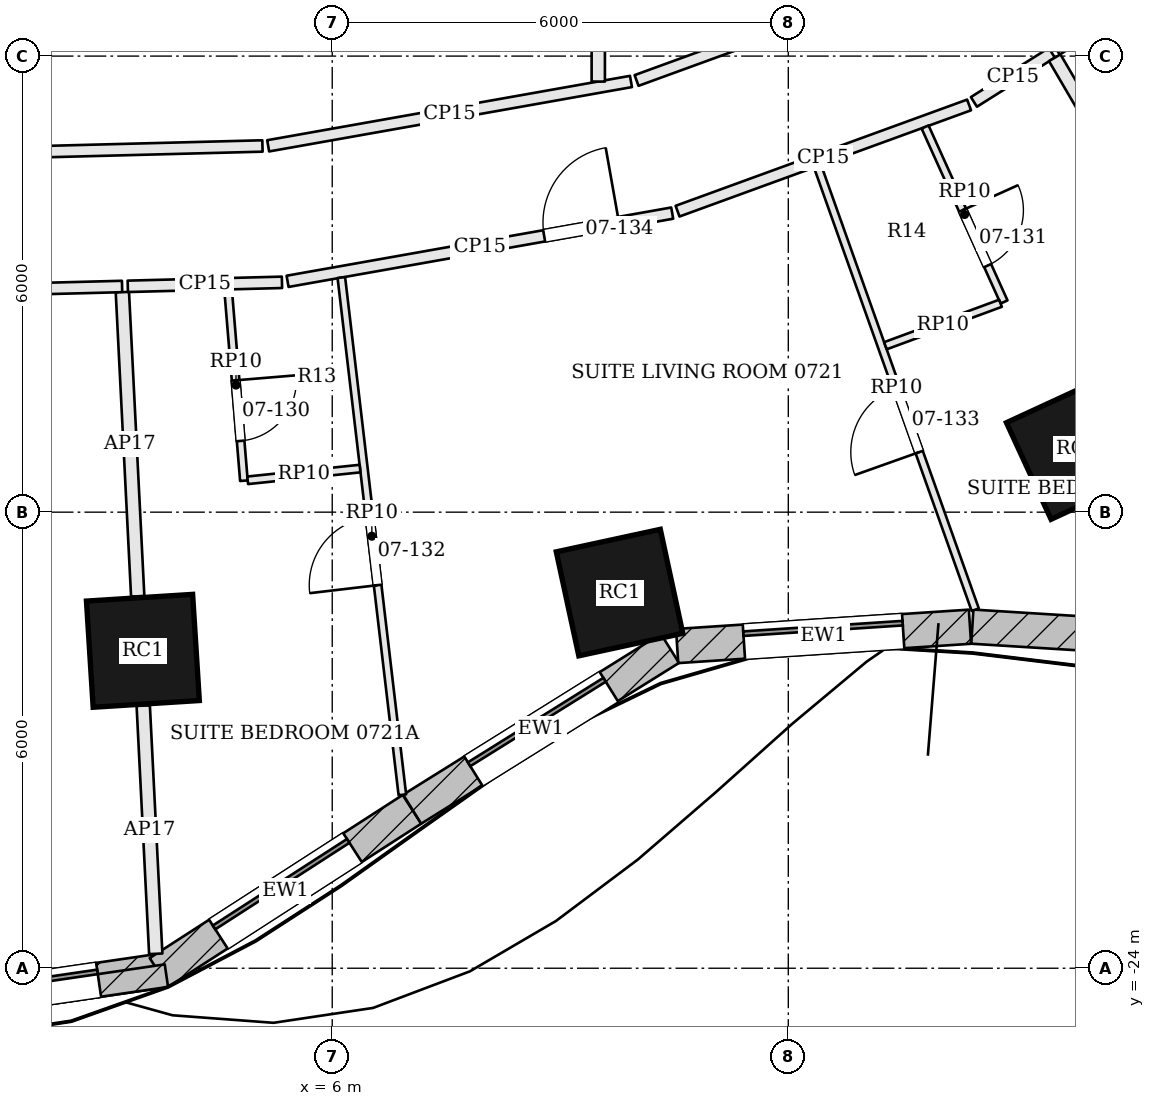
"""IFC4 building model, lengths in metres.
Left out: names, types, materials, properties, quantities, classifications, styles, units other than length and angle.
Written with IfcOpenShell. Run it as: python <this file> out.ifc"""

import sys

from ifc_helpers import new_model, si_unit, direction, frame, frame_2d, origin, origin_2d, place, context, subcontext, project, spatial, rectangle, extrude, element, fill, save


model = new_model("IFC4")
c1 = context("Model", 3, precision=1e-05, world=origin(), true_north=direction((0.0, 1.0)))
c2 = subcontext(c1, "Body", "Model", "MODEL_VIEW")
j1 = project(units=[si_unit("LENGTHUNIT", "METRE"), si_unit("PLANEANGLEUNIT", "RADIAN")], contexts=[c1])
p1 = place(None, origin())
s1 = spatial("IfcSite", under=j1, at=p1, CompositionType="ELEMENT")
p2 = place(p1, origin())
s2 = spatial("IfcBuilding", under=s1, at=p2, CompositionType="ELEMENT")
p3 = place(p2, frame((0.0, 0.0, 41.1)))
s3 = spatial("IfcBuildingStorey", under=s2, at=p3, CompositionType="ELEMENT", Elevation=41.1)
for number, where, z_axis, x_axis in (
    (1, (3.509, -19.824, 0.0), (0.0, 0.0, 1.0), (0.998, 0.063, 0.0)),
    (2, (9.78, -19.058, 0.0), (0.0, 0.0, 1.0), (0.977, 0.211, 0.0)),
    (3, (15.799, -17.165, 0.0), (0.0, 0.0, 1.0), (0.908, 0.419, 0.0)),
):
    element("IfcColumn", number, at=place(p3, frame(where, z_axis=z_axis, x_axis=x_axis)), inside=s3, PredefinedType="COLUMN", context=c2, shape_type="SweptSolid", body=[
        extrude(rectangle(XDim=1.4, YDim=1.4, at=origin_2d()), origin(), (0.0, 0.0, 1.0), 3.6),
    ])
p4 = place(p3, frame((-0.032, -24.584, 0.0), z_axis=(0.0, 0.0, 1.0), x_axis=(0.989495330387, 0.144564833698, 0.0)))
e4 = element("IfcWall", 4, at=p4, inside=s3, PredefinedType="SOLIDWALL", context=c2, shape_type="SweptSolid", body=[
    extrude(rectangle(XDim=3.881, YDim=0.45, at=frame_2d((1.94, 0.0))), origin(), (0.0, 0.0, 1.0), 3.4),
])
p5 = place(p4, frame((0.89, 0.0, 0.9)))
e5 = element("IfcOpeningElement", 5, at=p5, cuts=e4, PredefinedType="OPENING", context=c2, shape_type="SweptSolid", body=[
    extrude(rectangle(XDim=2.1, YDim=2.0, at=frame_2d((1.05, 1.0))), frame((0.0, 0.235, 0.0), z_axis=(0.0, -1.0, 0.0), x_axis=(1.0, 0.0, 0.0)), (0.0, 0.0, 1.0), 0.47),
])
p6 = place(p3, frame((3.721, -24.055, 0.0), z_axis=(0.0, 0.0, 1.0), x_axis=(0.840404438766, 0.54195975801, 0.0)))
e6 = element("IfcWall", 6, at=p6, inside=s3, PredefinedType="SOLIDWALL", context=c2, shape_type="SweptSolid", body=[
    extrude(rectangle(XDim=3.96, YDim=0.45, at=frame_2d((1.98, 0.0))), origin(), (0.0, 0.0, 1.0), 3.4),
])
p7 = place(p6, frame((0.93, 0.0, 0.9)))
e7 = element("IfcOpeningElement", 7, at=p7, cuts=e6, PredefinedType="OPENING", context=c2, shape_type="SweptSolid", body=[
    extrude(rectangle(XDim=2.1, YDim=2.0, at=frame_2d((1.05, 1.0))), frame((0.0, 0.235, 0.0), z_axis=(0.0, -1.0, 0.0), x_axis=(1.0, 0.0, 0.0)), (0.0, 0.0, 1.0), 0.47),
])
p8 = place(p3, frame((7.052, -21.907, 0.0), z_axis=(0.0, 0.0, 1.0), x_axis=(0.848498976054, 0.529197021566, 0.0)))
e8 = element("IfcWall", 8, at=p8, inside=s3, PredefinedType="SOLIDWALL", context=c2, shape_type="SweptSolid", body=[
    extrude(rectangle(XDim=3.997, YDim=0.45, at=frame_2d((1.998, 0.0))), origin(), (0.0, 0.0, 1.0), 3.4),
])
p9 = place(p8, frame((0.948, 0.0, 0.9)))
e9 = element("IfcOpeningElement", 9, at=p9, cuts=e8, PredefinedType="OPENING", context=c2, shape_type="SweptSolid", body=[
    extrude(rectangle(XDim=2.1, YDim=2.0, at=frame_2d((1.05, 1.0))), frame((0.0, 0.235, 0.0), z_axis=(0.0, -1.0, 0.0), x_axis=(1.0, 0.0, 0.0)), (0.0, 0.0, 1.0), 0.47),
])
p10 = place(p3, frame((10.537, -19.761, 0.0), z_axis=(0.0, 0.0, 1.0), x_axis=(0.997831357874, 0.065822346084, 0.0)))
e10 = element("IfcWall", 10, at=p10, inside=s3, PredefinedType="SOLIDWALL", context=c2, shape_type="SweptSolid", body=[
    extrude(rectangle(XDim=3.861, YDim=0.45, at=frame_2d((1.931, 0.0))), origin(), (0.0, 0.0, 1.0), 3.4),
])
p11 = place(p10, frame((0.881, 0.0, 0.9)))
e11 = element("IfcOpeningElement", 11, at=p11, cuts=e10, PredefinedType="OPENING", context=c2, shape_type="SweptSolid", body=[
    extrude(rectangle(XDim=2.1, YDim=2.0, at=frame_2d((1.05, 1.0))), frame((0.0, 0.235, 0.0), z_axis=(0.0, -1.0, 0.0), x_axis=(1.0, 0.0, 0.0)), (0.0, 0.0, 1.0), 0.47),
])
p12 = place(p3, frame((14.421, -19.506, 0.0), z_axis=(0.0, 0.0, 1.0), x_axis=(0.998078573447, -0.06196096534, 0.0)))
e12 = element("IfcWall", 12, at=p12, inside=s3, PredefinedType="SOLIDWALL", context=c2, shape_type="SweptSolid", body=[
    extrude(rectangle(XDim=5.682, YDim=0.45, at=frame_2d((2.841, 0.0))), origin(), (0.0, 0.0, 1.0), 3.4),
])
p13 = place(p12, frame((1.791, 0.0, 0.9)))
e13 = element("IfcOpeningElement", 13, at=p13, cuts=e12, PredefinedType="OPENING", context=c2, shape_type="SweptSolid", body=[
    extrude(rectangle(XDim=2.1, YDim=2.0, at=frame_2d((1.05, 1.0))), frame((0.0, 0.235, 0.0), z_axis=(0.0, -1.0, 0.0), x_axis=(1.0, 0.0, 0.0)), (0.0, 0.0, 1.0), 0.47),
])
p14 = place(p3, frame((0.091, -24.642, 3.6), z_axis=(0.0, 0.0, 1.0), x_axis=(0.989502691406, 0.144514441145, 0.0)))
e14 = element("IfcWall", 14, at=p14, inside=s3, PredefinedType="PARAPET", context=c2, shape_type="SweptSolid", body=[
    extrude(rectangle(XDim=3.767, YDim=0.3, at=frame_2d((1.884, 0.0))), origin(), (0.0, 0.0, 1.0), 1.1),
])
p15 = place(p3, frame((-2.114, -15.17, 0.0), z_axis=(0.0, 0.0, 1.0), x_axis=(0.99966176809, 0.02600671875, 0.0)))
e15 = element("IfcWall", 15, at=p15, inside=s3, PredefinedType="PARTITIONING", context=c2, shape_type="SweptSolid", body=[
    extrude(rectangle(XDim=5.351, YDim=0.15, at=frame_2d((2.675, 0.0))), origin(), (0.0, 0.0, 1.0), 2.68),
])
p16 = place(p15, frame((0.45, 0.0, 0.0)))
e16 = element("IfcOpeningElement", 16, at=p16, cuts=e15, PredefinedType="OPENING", context=c2, shape_type="SweptSolid", body=[
    extrude(rectangle(XDim=1.0, YDim=2.1, at=frame_2d((0.5, 1.05))), frame((0.0, 0.085, 0.0), z_axis=(0.0, -1.0, 0.0), x_axis=(1.0, 0.0, 0.0)), (0.0, 0.0, 1.0), 0.17),
])
p17 = place(p3, frame((3.678, -23.81, 0.0), z_axis=(0.0, 0.0, 1.0), x_axis=(-0.050406902628, 0.998728764063, 0.0)))
e17 = element("IfcWall", 17, at=p17, inside=s3, PredefinedType="PARTITIONING", context=c2, shape_type="SweptSolid", body=[
    extrude(rectangle(XDim=3.269, YDim=0.175, at=frame_2d((1.635, 0.0))), origin(), (0.0, 0.0, 1.0), 2.68),
])
p18 = place(p3, frame((3.441, -19.107, 0.0), z_axis=(0.0, 0.0, 1.0), x_axis=(-0.050399621173, 0.998729131539, 0.0)))
e18 = element("IfcWall", 18, at=p18, inside=s3, PredefinedType="PARTITIONING", context=c2, shape_type="SweptSolid", body=[
    extrude(rectangle(XDim=4.006, YDim=0.175, at=frame_2d((2.003, 0.0))), origin(), (0.0, 0.0, 1.0), 2.68),
])
p19 = place(p3, frame((3.31, -15.029, 0.0), z_axis=(0.0, 0.0, 1.0), x_axis=(0.99966219628, 0.025990254501, 0.0)))
e19 = element("IfcWall", 19, at=p19, inside=s3, PredefinedType="PARTITIONING", context=c2, shape_type="SweptSolid", body=[
    extrude(rectangle(XDim=2.029, YDim=0.15, at=frame_2d((1.015, 0.0))), origin(), (0.0, 0.0, 1.0), 2.68),
])
p20 = place(p3, frame((5.413, -14.963, 0.0), z_axis=(0.0, 0.0, 1.0), x_axis=(0.984633017555, 0.174636252655, 0.0)))
e20 = element("IfcWall", 20, at=p20, inside=s3, PredefinedType="PARTITIONING", context=c2, shape_type="SweptSolid", body=[
    extrude(rectangle(XDim=5.139, YDim=0.15, at=frame_2d((2.569, 0.0))), origin(), (0.0, 0.0, 1.0), 2.68),
])
p21 = place(p20, frame((3.428, 0.0, 0.0)))
e21 = element("IfcOpeningElement", 21, at=p21, cuts=e20, PredefinedType="OPENING", context=c2, shape_type="SweptSolid", body=[
    extrude(rectangle(XDim=1.0, YDim=2.1, at=frame_2d((0.5, 1.05))), frame((0.0, 0.085, 0.0), z_axis=(0.0, -1.0, 0.0), x_axis=(1.0, 0.0, 0.0)), (0.0, 0.0, 1.0), 0.17),
])
p22 = place(p3, frame((10.543, -14.04, 0.0), z_axis=(0.0, 0.0, 1.0), x_axis=(0.939576705301, 0.342338450741, 0.0)))
e22 = element("IfcWall", 22, at=p22, inside=s3, PredefinedType="PARTITIONING", context=c2, shape_type="SweptSolid", body=[
    extrude(rectangle(XDim=4.082, YDim=0.15, at=frame_2d((2.041, 0.0))), origin(), (0.0, 0.0, 1.0), 2.68),
])
p23 = place(p3, frame((14.442, -12.603, 0.0), z_axis=(0.0, 0.0, 1.0), x_axis=(0.845976983642, 0.533219413701, 0.0)))
e23 = element("IfcWall", 23, at=p23, inside=s3, PredefinedType="PARTITIONING", context=c2, shape_type="SweptSolid", body=[
    extrude(rectangle(XDim=1.211, YDim=0.15, at=frame_2d((0.606, 0.0))), origin(), (0.0, 0.0, 1.0), 2.68),
])
p24 = place(p3, frame((19.958, -19.62, 0.0), z_axis=(0.0, 0.0, 1.0), x_axis=(-0.505643381875, 0.862742586387, 0.0)))
e24 = element("IfcWall", 24, at=p24, inside=s3, PredefinedType="PARTITIONING", context=c2, shape_type="SweptSolid", body=[
    extrude(rectangle(XDim=8.808, YDim=0.175, at=frame_2d((4.404, 0.0))), origin(), (0.0, 0.0, 1.0), 2.68),
])
p25 = place(p3, frame((15.531, -11.917, 0.0), z_axis=(0.0, 0.0, 1.0), x_axis=(0.84600940038, 0.533167979598, 0.0)))
e25 = element("IfcWall", 25, at=p25, inside=s3, PredefinedType="PARTITIONING", context=c2, shape_type="SweptSolid", body=[
    extrude(rectangle(XDim=2.628, YDim=0.15, at=frame_2d((1.314, 0.0))), origin(), (0.0, 0.0, 1.0), 2.68),
])
p26 = place(p3, frame((13.511, -11.043, 0.0), z_axis=(0.0, 0.0, 1.0), x_axis=(-0.939583191704, -0.342320647736, 0.0)))
e26 = element("IfcWall", 26, at=p26, inside=s3, PredefinedType="PARTITIONING", context=c2, shape_type="SweptSolid", body=[
    extrude(rectangle(XDim=3.733, YDim=0.15, at=frame_2d((1.866, 0.0))), origin(), (0.0, 0.0, 1.0), 2.68),
])
p27 = place(p3, frame((9.93, -12.334, 0.0), z_axis=(0.0, 0.0, 1.0), x_axis=(-0.984638212434, -0.174606960386, 0.0)))
e27 = element("IfcWall", 27, at=p27, inside=s3, PredefinedType="PARTITIONING", context=c2, shape_type="SweptSolid", body=[
    extrude(rectangle(XDim=4.848, YDim=0.15, at=frame_2d((2.424, 0.0))), origin(), (0.0, 0.0, 1.0), 2.68),
])
p28 = place(p3, frame((5.082, -13.182, 0.0), z_axis=(0.0, 0.0, 1.0), x_axis=(-0.999661624383, -0.026012242045, 0.0)))
e28 = element("IfcWall", 28, at=p28, inside=s3, PredefinedType="PARTITIONING", context=c2, shape_type="SweptSolid", body=[
    extrude(rectangle(XDim=7.218, YDim=0.15, at=frame_2d((3.609, 0.0))), origin(), (0.0, 0.0, 1.0), 2.68),
])
p29 = place(p3, frame((6.923, -21.718, 0.0), z_axis=(0.0, 0.0, 1.0), x_axis=(-0.117159623324, 0.993113096612, 0.0)))
e29 = element("IfcWall", 29, at=p29, inside=s3, PredefinedType="PARTITIONING", context=c2, shape_type="SweptSolid", body=[
    extrude(rectangle(XDim=6.852, YDim=0.1, at=frame_2d((3.426, 0.0))), origin(), (0.0, 0.0, 1.0), 2.68),
])
p30 = place(p29, frame((2.777, 0.0, 0.0)))
e30 = element("IfcOpeningElement", 30, at=p30, cuts=e29, PredefinedType="OPENING", context=c2, shape_type="SweptSolid", body=[
    extrude(rectangle(XDim=0.9, YDim=2.4, at=frame_2d((0.45, 1.2))), frame((0.0, 0.06, 0.0), z_axis=(0.0, -1.0, 0.0), x_axis=(1.0, 0.0, 0.0)), (0.0, 0.0, 1.0), 0.12),
])
p31 = place(p3, frame((14.459, -19.283, 0.0), z_axis=(0.0, 0.0, 1.0), x_axis=(-0.33505478158, 0.942198648556, 0.0)))
e31 = element("IfcWall", 31, at=p31, inside=s3, PredefinedType="PARTITIONING", context=c2, shape_type="SweptSolid", body=[
    extrude(rectangle(XDim=6.192, YDim=0.1, at=frame_2d((3.096, 0.0))), origin(), (0.0, 0.0, 1.0), 2.68),
])
p32 = place(p31, frame((2.2, 0.0, 0.0)))
e32 = element("IfcOpeningElement", 32, at=p32, cuts=e31, PredefinedType="OPENING", context=c2, shape_type="SweptSolid", body=[
    extrude(rectangle(XDim=0.9, YDim=2.4, at=frame_2d((0.45, 1.2))), frame((0.0, 0.06, 0.0), z_axis=(0.0, -1.0, 0.0), x_axis=(1.0, 0.0, 0.0)), (0.0, 0.0, 1.0), 0.12),
])
p33 = place(p3, frame((4.63, -15.07, 0.0), z_axis=(0.0, 0.0, 1.0), x_axis=(0.08247732406, -0.996592941484, 0.0)))
e33 = element("IfcWall", 33, at=p33, inside=s3, PredefinedType="PARTITIONING", context=c2, shape_type="SweptSolid", body=[
    extrude(rectangle(XDim=2.525, YDim=0.1, at=frame_2d((1.262, 0.0))), origin(), (0.0, 0.0, 1.0), 2.68),
])
p34 = place(p33, frame((1.2, 0.0, 0.0)))
e34 = element("IfcOpeningElement", 34, at=p34, cuts=e33, PredefinedType="OPENING", context=c2, shape_type="SweptSolid", body=[
    extrude(rectangle(XDim=0.8, YDim=2.1, at=frame_2d((0.4, 1.05))), frame((0.0, 0.06, 0.0), z_axis=(0.0, -1.0, 0.0), x_axis=(1.0, 0.0, 0.0)), (0.0, 0.0, 1.0), 0.12),
])
p35 = place(p3, frame((4.888, -17.581, 0.0), z_axis=(0.0, 0.0, 1.0), x_axis=(0.994596876319, 0.103812588907, 0.0)))
e35 = element("IfcWall", 35, at=p35, inside=s3, PredefinedType="PARTITIONING", context=c2, shape_type="SweptSolid", body=[
    extrude(rectangle(XDim=1.486, YDim=0.1, at=frame_2d((0.743, 0.0))), origin(), (0.0, 0.0, 1.0), 2.68),
])
p36 = place(p3, frame((13.8, -12.933, 0.0), z_axis=(0.0, 0.0, 1.0), x_axis=(0.411317277425, -0.91149223655, 0.0)))
e36 = element("IfcWall", 36, at=p36, inside=s3, PredefinedType="PARTITIONING", context=c2, shape_type="SweptSolid", body=[
    extrude(rectangle(XDim=2.525, YDim=0.1, at=frame_2d((1.262, 0.0))), origin(), (0.0, 0.0, 1.0), 2.68),
])
p37 = place(p36, frame((1.2, 0.0, 0.0)))
e37 = element("IfcOpeningElement", 37, at=p37, cuts=e36, PredefinedType="OPENING", context=c2, shape_type="SweptSolid", body=[
    extrude(rectangle(XDim=0.8, YDim=2.1, at=frame_2d((0.4, 1.05))), frame((0.0, 0.06, 0.0), z_axis=(0.0, -1.0, 0.0), x_axis=(1.0, 0.0, 0.0)), (0.0, 0.0, 1.0), 0.12),
])
p38 = place(p3, frame((14.792, -15.252, 0.0), z_axis=(0.0, 0.0, 1.0), x_axis=(-0.93817510653, -0.346161045596, 0.0)))
e38 = element("IfcWall", 38, at=p38, inside=s3, PredefinedType="PARTITIONING", context=c2, shape_type="SweptSolid", body=[
    extrude(rectangle(XDim=1.614, YDim=0.1, at=frame_2d((0.807, 0.0))), origin(), (0.0, 0.0, 1.0), 2.68),
])
p39 = place(p3, frame((9.5, -12.335, 0.0), z_axis=(0.0, 0.0, 1.0), x_axis=(0.0, 1.0, 0.0)))
e39 = element("IfcWall", 39, at=p39, inside=s3, PredefinedType="PARTITIONING", context=c2, shape_type="SweptSolid", body=[
    extrude(rectangle(XDim=7.46, YDim=0.175, at=frame_2d((3.73, 0.0))), origin(), (0.0, 0.0, 1.0), 2.68),
])
p40 = place(p5, origin())
e40 = element("IfcWindow", 40, at=p40, inside=s3, PartitioningType="SINGLE_PANEL", PredefinedType="WINDOW", context=c2, shape_type="SweptSolid", body=[
    extrude(rectangle(XDim=2.1, YDim=2.0, at=frame_2d((1.05, 1.0))), frame((0.0, 0.135, 0.0), z_axis=(0.0, -1.0, 0.0), x_axis=(1.0, 0.0, 0.0)), (0.0, 0.0, 1.0), 0.06),
])
fill(e5, e40)
p41 = place(p7, origin())
e41 = element("IfcWindow", 41, at=p41, inside=s3, PartitioningType="SINGLE_PANEL", PredefinedType="WINDOW", context=c2, shape_type="SweptSolid", body=[
    extrude(rectangle(XDim=2.1, YDim=2.0, at=frame_2d((1.05, 1.0))), frame((0.0, 0.135, 0.0), z_axis=(0.0, -1.0, 0.0), x_axis=(1.0, 0.0, 0.0)), (0.0, 0.0, 1.0), 0.06),
])
fill(e7, e41)
p42 = place(p9, origin())
e42 = element("IfcWindow", 42, at=p42, inside=s3, PartitioningType="SINGLE_PANEL", PredefinedType="WINDOW", context=c2, shape_type="SweptSolid", body=[
    extrude(rectangle(XDim=2.1, YDim=2.0, at=frame_2d((1.05, 1.0))), frame((0.0, 0.135, 0.0), z_axis=(0.0, -1.0, 0.0), x_axis=(1.0, 0.0, 0.0)), (0.0, 0.0, 1.0), 0.06),
])
fill(e9, e42)
p43 = place(p11, origin())
e43 = element("IfcWindow", 43, at=p43, inside=s3, PartitioningType="SINGLE_PANEL", PredefinedType="WINDOW", context=c2, shape_type="SweptSolid", body=[
    extrude(rectangle(XDim=2.1, YDim=2.0, at=frame_2d((1.05, 1.0))), frame((0.0, 0.135, 0.0), z_axis=(0.0, -1.0, 0.0), x_axis=(1.0, 0.0, 0.0)), (0.0, 0.0, 1.0), 0.06),
])
fill(e11, e43)
p44 = place(p34, origin())
e44 = element("IfcDoor", 44, at=p44, inside=s3, OperationType="SINGLE_SWING_LEFT", PredefinedType="DOOR", context=c2, shape_type="SweptSolid", body=[
    extrude(rectangle(XDim=0.8, YDim=2.1, at=frame_2d((0.4, 1.05))), frame((0.0, 0.025, 0.0), z_axis=(0.0, -1.0, 0.0), x_axis=(1.0, 0.0, 0.0)), (0.0, 0.0, 1.0), 0.05),
])
fill(e34, e44)
p45 = place(p37, origin())
e45 = element("IfcDoor", 45, at=p45, inside=s3, OperationType="SINGLE_SWING_LEFT", PredefinedType="DOOR", context=c2, shape_type="SweptSolid", body=[
    extrude(rectangle(XDim=0.8, YDim=2.1, at=frame_2d((0.4, 1.05))), frame((0.0, 0.025, 0.0), z_axis=(0.0, -1.0, 0.0), x_axis=(1.0, 0.0, 0.0)), (0.0, 0.0, 1.0), 0.05),
])
fill(e37, e45)
p46 = place(p30, origin())
e46 = element("IfcDoor", 46, at=p46, inside=s3, OperationType="SINGLE_SWING_LEFT", PredefinedType="DOOR", context=c2, shape_type="SweptSolid", body=[
    extrude(rectangle(XDim=0.9, YDim=2.4, at=frame_2d((0.45, 1.2))), frame((0.0, 0.025, 0.0), z_axis=(0.0, -1.0, 0.0), x_axis=(1.0, 0.0, 0.0)), (0.0, 0.0, 1.0), 0.05),
])
fill(e30, e46)
p47 = place(p32, origin())
e47 = element("IfcDoor", 47, at=p47, inside=s3, OperationType="SINGLE_SWING_LEFT", PredefinedType="DOOR", context=c2, shape_type="SweptSolid", body=[
    extrude(rectangle(XDim=0.9, YDim=2.4, at=frame_2d((0.45, 1.2))), frame((0.0, 0.025, 0.0), z_axis=(0.0, -1.0, 0.0), x_axis=(1.0, 0.0, 0.0)), (0.0, 0.0, 1.0), 0.05),
])
fill(e32, e47)
p48 = place(p21, origin())
e48 = element("IfcDoor", 48, at=p48, inside=s3, OperationType="SINGLE_SWING_RIGHT", PredefinedType="DOOR", context=c2, shape_type="SweptSolid", body=[
    extrude(rectangle(XDim=1.0, YDim=2.1, at=frame_2d((0.5, 1.05))), frame((0.0, 0.025, 0.0), z_axis=(0.0, -1.0, 0.0), x_axis=(1.0, 0.0, 0.0)), (0.0, 0.0, 1.0), 0.05),
])
fill(e21, e48)
save(model, sys.argv[1])
